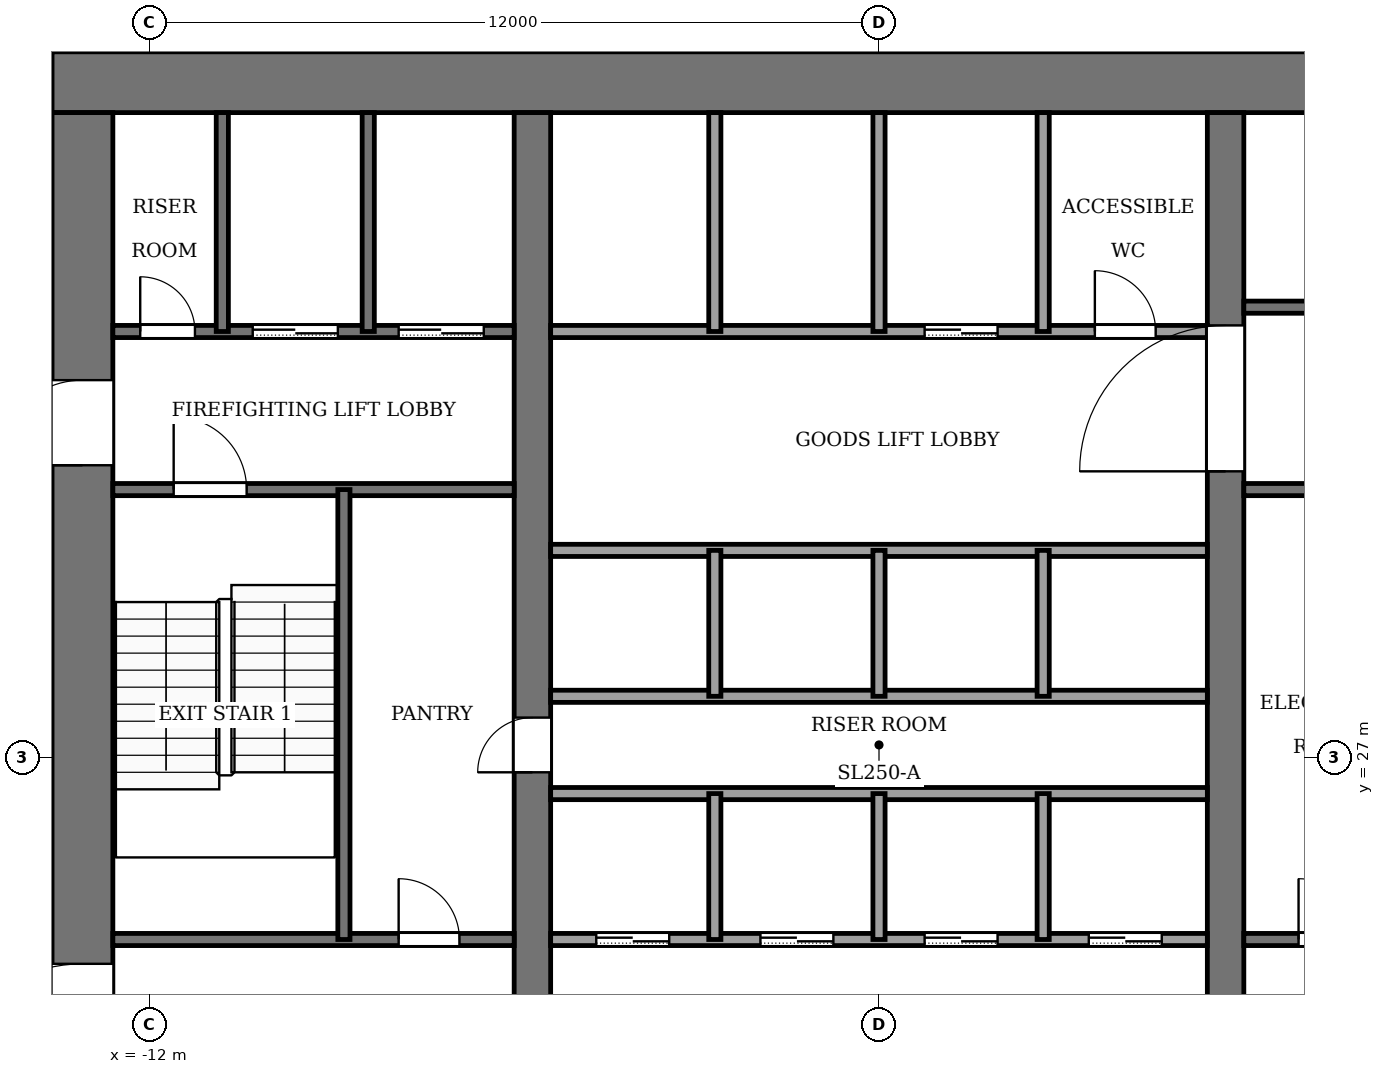
"""IFC4 building model, lengths in metres.
Left out: names, types, materials, properties, quantities, classifications, styles, units other than length and angle.
Written with IfcOpenShell. Run it as: python <this file> out.ifc"""

import sys

from ifc_helpers import new_model, si_unit, direction, frame, frame_2d, origin, place, context, subcontext, project, spatial, rectangle, extrude, element, fill, save


model = new_model("IFC4")
c1 = context("Model", 3, precision=1e-05, world=origin(), true_north=direction((0.0, 1.0)))
c2 = subcontext(c1, "Body", "Model", "MODEL_VIEW")
j1 = project(units=[si_unit("LENGTHUNIT", "METRE"), si_unit("PLANEANGLEUNIT", "RADIAN")], contexts=[c1])
p1 = place(None, origin())
s1 = spatial("IfcSite", under=j1, at=p1, CompositionType="ELEMENT")
p2 = place(p1, origin())
s2 = spatial("IfcBuilding", under=s1, at=p2, CompositionType="ELEMENT")
p3 = place(p2, frame((0.0, 0.0, 154.0)))
s3 = spatial("IfcBuildingStorey", under=s2, at=p3, CompositionType="ELEMENT", Elevation=154.0)
p4 = place(p3, frame((-13.6, 38.1, -0.13), z_axis=(0.0, 0.0, 1.0), x_axis=(1.0, 0.0, 0.0)))
e1 = element("IfcWall", 1, at=p4, inside=s3, PredefinedType="SHEAR", context=c2, shape_type="SweptSolid", body=[
    extrude(rectangle(XDim=27.2, YDim=1.0, at=frame_2d((13.6, 0.0))), origin(), (0.0, 0.0, 1.0), 4.0),
])
p5 = place(p3, frame((-13.1, 18.4, -0.13), z_axis=(0.0, 0.0, 1.0), x_axis=(0.0, 1.0, 0.0)))
e2 = element("IfcWall", 2, at=p5, inside=s3, PredefinedType="SHEAR", context=c2, shape_type="SweptSolid", body=[
    extrude(rectangle(XDim=19.2, YDim=1.0, at=frame_2d((9.6, 0.0))), origin(), (0.0, 0.0, 1.0), 4.0),
])
p6 = place(p5, frame((2.8, 0.0, 0.13)))
e3 = element("IfcOpeningElement", 3, at=p6, cuts=e2, PredefinedType="OPENING", context=c2, shape_type="SweptSolid", body=[
    extrude(rectangle(XDim=2.4, YDim=2.4, at=frame_2d((1.2, 1.2))), frame((0.0, 0.51, 0.0), z_axis=(0.0, -1.0, 0.0), x_axis=(1.0, 0.0, 0.0)), (0.0, 0.0, 1.0), 1.02),
])
p7 = place(p5, frame((13.4, 0.0, 0.13)))
e4 = element("IfcOpeningElement", 4, at=p7, cuts=e2, PredefinedType="OPENING", context=c2, shape_type="SweptSolid", body=[
    extrude(rectangle(XDim=1.4, YDim=2.2, at=frame_2d((0.7, 1.1))), frame((0.0, 0.51, 0.0), z_axis=(0.0, -1.0, 0.0), x_axis=(1.0, 0.0, 0.0)), (0.0, 0.0, 1.0), 1.02),
])
p8 = place(p3, frame((-5.7, 18.4, -0.13), z_axis=(0.0, 0.0, 1.0), x_axis=(0.0, 1.0, 0.0)))
e5 = element("IfcWall", 5, at=p8, inside=s3, PredefinedType="SHEAR", context=c2, shape_type="SweptSolid", body=[
    extrude(rectangle(XDim=19.2, YDim=0.6, at=frame_2d((9.6, 0.0))), origin(), (0.0, 0.0, 1.0), 4.0),
])
p9 = place(p8, frame((8.35, 0.0, 0.13)))
e6 = element("IfcOpeningElement", 6, at=p9, cuts=e5, PredefinedType="OPENING", context=c2, shape_type="SweptSolid", body=[
    extrude(rectangle(XDim=0.9, YDim=2.1, at=frame_2d((0.45, 1.05))), frame((0.0, 0.31, 0.0), z_axis=(0.0, -1.0, 0.0), x_axis=(1.0, 0.0, 0.0)), (0.0, 0.0, 1.0), 0.62),
])
p10 = place(p3, frame((5.7, 18.4, -0.13), z_axis=(0.0, 0.0, 1.0), x_axis=(0.0, 1.0, 0.0)))
e7 = element("IfcWall", 7, at=p10, inside=s3, PredefinedType="SHEAR", context=c2, shape_type="SweptSolid", body=[
    extrude(rectangle(XDim=19.2, YDim=0.6, at=frame_2d((9.6, 0.0))), origin(), (0.0, 0.0, 1.0), 4.0),
])
p11 = place(p10, frame((13.3, 0.0, 0.13)))
e8 = element("IfcOpeningElement", 8, at=p11, cuts=e7, PredefinedType="OPENING", context=c2, shape_type="SweptSolid", body=[
    extrude(rectangle(XDim=2.4, YDim=2.4, at=frame_2d((1.2, 1.2))), frame((0.0, 0.31, 0.0), z_axis=(0.0, -1.0, 0.0), x_axis=(1.0, 0.0, 0.0)), (0.0, 0.0, 1.0), 0.62),
])
p12 = place(p3, frame((-12.6, 24.0, 0.0), z_axis=(0.0, 0.0, 1.0), x_axis=(1.0, 0.0, 0.0)))
e9 = element("IfcWall", 9, at=p12, inside=s3, PredefinedType="PARTITIONING", context=c2, shape_type="SweptSolid", body=[
    extrude(rectangle(XDim=6.6, YDim=0.2, at=frame_2d((3.3, 0.0))), origin(), (0.0, 0.0, 1.0), 3.87),
])
p13 = place(p12, frame((4.7, 0.0, 0.0)))
e10 = element("IfcOpeningElement", 10, at=p13, cuts=e9, PredefinedType="OPENING", context=c2, shape_type="SweptSolid", body=[
    extrude(rectangle(XDim=1.0, YDim=2.1, at=frame_2d((0.5, 1.05))), frame((0.0, 0.11, 0.0), z_axis=(0.0, -1.0, 0.0), x_axis=(1.0, 0.0, 0.0)), (0.0, 0.0, 1.0), 0.22),
])
p14 = place(p3, frame((-5.4, 24.0, 0.0), z_axis=(0.0, 0.0, 1.0), x_axis=(1.0, 0.0, 0.0)))
e11 = element("IfcWall", 11, at=p14, inside=s3, PredefinedType="PARTITIONING", context=c2, shape_type="SweptSolid", body=[
    extrude(rectangle(XDim=10.8, YDim=0.2, at=frame_2d((5.4, 0.0))), origin(), (0.0, 0.0, 1.0), 3.87),
])
p15 = place(p14, frame((0.75, 0.0, 0.0)))
e12 = element("IfcOpeningElement", 12, at=p15, cuts=e11, PredefinedType="OPENING", context=c2, shape_type="SweptSolid", body=[
    extrude(rectangle(XDim=1.2, YDim=2.2, at=frame_2d((0.6, 1.1))), frame((0.0, 0.11, 0.0), z_axis=(0.0, -1.0, 0.0), x_axis=(1.0, 0.0, 0.0)), (0.0, 0.0, 1.0), 0.22),
])
p16 = place(p14, frame((3.45, 0.0, 0.0)))
e13 = element("IfcOpeningElement", 13, at=p16, cuts=e11, PredefinedType="OPENING", context=c2, shape_type="SweptSolid", body=[
    extrude(rectangle(XDim=1.2, YDim=2.2, at=frame_2d((0.6, 1.1))), frame((0.0, 0.11, 0.0), z_axis=(0.0, -1.0, 0.0), x_axis=(1.0, 0.0, 0.0)), (0.0, 0.0, 1.0), 0.22),
])
p17 = place(p14, frame((6.15, 0.0, 0.0)))
e14 = element("IfcOpeningElement", 14, at=p17, cuts=e11, PredefinedType="OPENING", context=c2, shape_type="SweptSolid", body=[
    extrude(rectangle(XDim=1.2, YDim=2.2, at=frame_2d((0.6, 1.1))), frame((0.0, 0.11, 0.0), z_axis=(0.0, -1.0, 0.0), x_axis=(1.0, 0.0, 0.0)), (0.0, 0.0, 1.0), 0.22),
])
p18 = place(p14, frame((8.85, 0.0, 0.0)))
e15 = element("IfcOpeningElement", 15, at=p18, cuts=e11, PredefinedType="OPENING", context=c2, shape_type="SweptSolid", body=[
    extrude(rectangle(XDim=1.2, YDim=2.2, at=frame_2d((0.6, 1.1))), frame((0.0, 0.11, 0.0), z_axis=(0.0, -1.0, 0.0), x_axis=(1.0, 0.0, 0.0)), (0.0, 0.0, 1.0), 0.22),
])
p19 = place(p3, frame((6.0, 24.0, 0.0), z_axis=(0.0, 0.0, 1.0), x_axis=(1.0, 0.0, 0.0)))
e16 = element("IfcWall", 16, at=p19, inside=s3, PredefinedType="PARTITIONING", context=c2, shape_type="SweptSolid", body=[
    extrude(rectangle(XDim=6.6, YDim=0.2, at=frame_2d((3.3, 0.0))), origin(), (0.0, 0.0, 1.0), 3.87),
])
p20 = place(p19, frame((0.9, 0.0, 0.0)))
e17 = element("IfcOpeningElement", 17, at=p20, cuts=e16, PredefinedType="OPENING", context=c2, shape_type="SweptSolid", body=[
    extrude(rectangle(XDim=1.0, YDim=2.1, at=frame_2d((0.5, 1.05))), frame((0.0, 0.11, 0.0), z_axis=(0.0, -1.0, 0.0), x_axis=(1.0, 0.0, 0.0)), (0.0, 0.0, 1.0), 0.22),
])
p21 = place(p19, frame((4.4, 0.0, 0.0)))
e18 = element("IfcOpeningElement", 18, at=p21, cuts=e16, PredefinedType="OPENING", context=c2, shape_type="SweptSolid", body=[
    extrude(rectangle(XDim=1.2, YDim=2.2, at=frame_2d((0.6, 1.1))), frame((0.0, 0.11, 0.0), z_axis=(0.0, -1.0, 0.0), x_axis=(1.0, 0.0, 0.0)), (0.0, 0.0, 1.0), 0.22),
])
for number, where, z_axis, x_axis in (
    (19, (-5.4, 26.4, 0.0), (0.0, 0.0, 1.0), (1.0, 0.0, 0.0)),
    (20, (-5.4, 28.0, 0.0), (0.0, 0.0, 1.0), (1.0, 0.0, 0.0)),
    (21, (-5.4, 30.4, 0.0), (0.0, 0.0, 1.0), (1.0, 0.0, 0.0)),
):
    element("IfcWall", number, at=place(p3, frame(where, z_axis=z_axis, x_axis=x_axis)), inside=s3, PredefinedType="PARTITIONING", context=c2, shape_type="SweptSolid", body=[
        extrude(rectangle(XDim=10.8, YDim=0.2, at=frame_2d((5.4, 0.0))), origin(), (0.0, 0.0, 1.0), 3.87),
    ])
p22 = place(p3, frame((-12.6, 31.4, 0.0), z_axis=(0.0, 0.0, 1.0), x_axis=(1.0, 0.0, 0.0)))
e22 = element("IfcWall", 22, at=p22, inside=s3, PredefinedType="PARTITIONING", context=c2, shape_type="SweptSolid", body=[
    extrude(rectangle(XDim=6.6, YDim=0.2, at=frame_2d((3.3, 0.0))), origin(), (0.0, 0.0, 1.0), 3.87),
])
p23 = place(p22, frame((1.0, 0.0, 0.0)))
e23 = element("IfcOpeningElement", 23, at=p23, cuts=e22, PredefinedType="OPENING", context=c2, shape_type="SweptSolid", body=[
    extrude(rectangle(XDim=1.2, YDim=2.2, at=frame_2d((0.6, 1.1))), frame((0.0, 0.11, 0.0), z_axis=(0.0, -1.0, 0.0), x_axis=(1.0, 0.0, 0.0)), (0.0, 0.0, 1.0), 0.22),
])
p24 = place(p3, frame((6.0, 31.4, 0.0), z_axis=(0.0, 0.0, 1.0), x_axis=(1.0, 0.0, 0.0)))
e24 = element("IfcWall", 24, at=p24, inside=s3, PredefinedType="PARTITIONING", context=c2, shape_type="SweptSolid", body=[
    extrude(rectangle(XDim=6.6, YDim=0.2, at=frame_2d((3.3, 0.0))), origin(), (0.0, 0.0, 1.0), 3.87),
])
p25 = place(p3, frame((-12.6, 34.0, 0.0), z_axis=(0.0, 0.0, 1.0), x_axis=(1.0, 0.0, 0.0)))
e25 = element("IfcWall", 25, at=p25, inside=s3, PredefinedType="PARTITIONING", context=c2, shape_type="SweptSolid", body=[
    extrude(rectangle(XDim=6.6, YDim=0.2, at=frame_2d((3.3, 0.0))), origin(), (0.0, 0.0, 1.0), 3.87),
])
p26 = place(p25, frame((4.7, 0.0, 0.0)))
e26 = element("IfcOpeningElement", 26, at=p26, cuts=e25, PredefinedType="OPENING", context=c2, shape_type="SweptSolid", body=[
    extrude(rectangle(XDim=1.4, YDim=2.2, at=frame_2d((0.7, 1.1))), frame((0.0, 0.11, 0.0), z_axis=(0.0, -1.0, 0.0), x_axis=(1.0, 0.0, 0.0)), (0.0, 0.0, 1.0), 0.22),
])
p27 = place(p25, frame((2.3, 0.0, 0.0)))
e27 = element("IfcOpeningElement", 27, at=p27, cuts=e25, PredefinedType="OPENING", context=c2, shape_type="SweptSolid", body=[
    extrude(rectangle(XDim=1.4, YDim=2.2, at=frame_2d((0.7, 1.1))), frame((0.0, 0.11, 0.0), z_axis=(0.0, -1.0, 0.0), x_axis=(1.0, 0.0, 0.0)), (0.0, 0.0, 1.0), 0.22),
])
p28 = place(p25, frame((0.45, 0.0, 0.0)))
e28 = element("IfcOpeningElement", 28, at=p28, cuts=e25, PredefinedType="OPENING", context=c2, shape_type="SweptSolid", body=[
    extrude(rectangle(XDim=0.9, YDim=2.1, at=frame_2d((0.45, 1.05))), frame((0.0, 0.11, 0.0), z_axis=(0.0, -1.0, 0.0), x_axis=(1.0, 0.0, 0.0)), (0.0, 0.0, 1.0), 0.22),
])
p29 = place(p3, frame((-5.4, 34.0, 0.0), z_axis=(0.0, 0.0, 1.0), x_axis=(1.0, 0.0, 0.0)))
e29 = element("IfcWall", 29, at=p29, inside=s3, PredefinedType="PARTITIONING", context=c2, shape_type="SweptSolid", body=[
    extrude(rectangle(XDim=10.8, YDim=0.2, at=frame_2d((5.4, 0.0))), origin(), (0.0, 0.0, 1.0), 3.87),
])
p30 = place(p29, frame((6.15, 0.0, 0.0)))
e30 = element("IfcOpeningElement", 30, at=p30, cuts=e29, PredefinedType="OPENING", context=c2, shape_type="SweptSolid", body=[
    extrude(rectangle(XDim=1.2, YDim=2.2, at=frame_2d((0.6, 1.1))), frame((0.0, 0.11, 0.0), z_axis=(0.0, -1.0, 0.0), x_axis=(1.0, 0.0, 0.0)), (0.0, 0.0, 1.0), 0.22),
])
p31 = place(p29, frame((8.95, 0.0, 0.0)))
e31 = element("IfcOpeningElement", 31, at=p31, cuts=e29, PredefinedType="OPENING", context=c2, shape_type="SweptSolid", body=[
    extrude(rectangle(XDim=1.0, YDim=2.1, at=frame_2d((0.5, 1.05))), frame((0.0, 0.11, 0.0), z_axis=(0.0, -1.0, 0.0), x_axis=(1.0, 0.0, 0.0)), (0.0, 0.0, 1.0), 0.22),
])
p32 = place(p3, frame((6.0, 34.4, 0.0), z_axis=(0.0, 0.0, 1.0), x_axis=(1.0, 0.0, 0.0)))
e32 = element("IfcWall", 32, at=p32, inside=s3, PredefinedType="PARTITIONING", context=c2, shape_type="SweptSolid", body=[
    extrude(rectangle(XDim=6.6, YDim=0.2, at=frame_2d((3.3, 0.0))), origin(), (0.0, 0.0, 1.0), 3.87),
])
p33 = place(p32, frame((4.8, 0.0, 0.0)))
e33 = element("IfcOpeningElement", 33, at=p33, cuts=e32, PredefinedType="OPENING", context=c2, shape_type="SweptSolid", body=[
    extrude(rectangle(XDim=1.2, YDim=2.2, at=frame_2d((0.6, 1.1))), frame((0.0, 0.11, 0.0), z_axis=(0.0, -1.0, 0.0), x_axis=(1.0, 0.0, 0.0)), (0.0, 0.0, 1.0), 0.22),
])
p34 = place(p3, frame((-10.8, 34.0, 0.0), z_axis=(0.0, 0.0, 1.0), x_axis=(0.0, 1.0, 0.0)))
e34 = element("IfcWall", 34, at=p34, inside=s3, PredefinedType="PARTITIONING", context=c2, shape_type="SweptSolid", body=[
    extrude(rectangle(XDim=3.6, YDim=0.2, at=frame_2d((1.8, 0.0))), origin(), (0.0, 0.0, 1.0), 3.87),
])
p35 = place(p3, frame((-8.8, 24.0, 0.0), z_axis=(0.0, 0.0, 1.0), x_axis=(0.0, 1.0, 0.0)))
e35 = element("IfcWall", 35, at=p35, inside=s3, PredefinedType="PARTITIONING", context=c2, shape_type="SweptSolid", body=[
    extrude(rectangle(XDim=7.4, YDim=0.2, at=frame_2d((3.7, 0.0))), origin(), (0.0, 0.0, 1.0), 3.87),
])
p36 = place(p3, frame((-8.4, 34.0, 0.0), z_axis=(0.0, 0.0, 1.0), x_axis=(0.0, 1.0, 0.0)))
e36 = element("IfcWall", 36, at=p36, inside=s3, PredefinedType="PARTITIONING", context=c2, shape_type="SweptSolid", body=[
    extrude(rectangle(XDim=3.6, YDim=0.2, at=frame_2d((1.8, 0.0))), origin(), (0.0, 0.0, 1.0), 3.87),
])
for number, where, z_axis, x_axis in (
    (37, (-2.7, 24.0, 0.0), (0.0, 0.0, 1.0), (0.0, 1.0, 0.0)),
    (38, (-2.7, 28.0, 0.0), (0.0, 0.0, 1.0), (0.0, 1.0, 0.0)),
):
    element("IfcWall", number, at=place(p3, frame(where, z_axis=z_axis, x_axis=x_axis)), inside=s3, PredefinedType="PARTITIONING", context=c2, shape_type="SweptSolid", body=[
        extrude(rectangle(XDim=2.4, YDim=0.2, at=frame_2d((1.2, 0.0))), origin(), (0.0, 0.0, 1.0), 3.87),
    ])
p37 = place(p3, frame((-2.7, 34.0, 0.0), z_axis=(0.0, 0.0, 1.0), x_axis=(0.0, 1.0, 0.0)))
e39 = element("IfcWall", 39, at=p37, inside=s3, PredefinedType="PARTITIONING", context=c2, shape_type="SweptSolid", body=[
    extrude(rectangle(XDim=3.6, YDim=0.2, at=frame_2d((1.8, 0.0))), origin(), (0.0, 0.0, 1.0), 3.87),
])
for number, where, z_axis, x_axis in (
    (40, (0.0, 24.0, 0.0), (0.0, 0.0, 1.0), (0.0, 1.0, 0.0)),
    (41, (0.0, 28.0, 0.0), (0.0, 0.0, 1.0), (0.0, 1.0, 0.0)),
):
    element("IfcWall", number, at=place(p3, frame(where, z_axis=z_axis, x_axis=x_axis)), inside=s3, PredefinedType="PARTITIONING", context=c2, shape_type="SweptSolid", body=[
        extrude(rectangle(XDim=2.4, YDim=0.2, at=frame_2d((1.2, 0.0))), origin(), (0.0, 0.0, 1.0), 3.87),
    ])
p38 = place(p3, frame((0.0, 34.0, 0.0), z_axis=(0.0, 0.0, 1.0), x_axis=(0.0, 1.0, 0.0)))
e42 = element("IfcWall", 42, at=p38, inside=s3, PredefinedType="PARTITIONING", context=c2, shape_type="SweptSolid", body=[
    extrude(rectangle(XDim=3.6, YDim=0.2, at=frame_2d((1.8, 0.0))), origin(), (0.0, 0.0, 1.0), 3.87),
])
for number, where, z_axis, x_axis in (
    (43, (2.7, 24.0, 0.0), (0.0, 0.0, 1.0), (0.0, 1.0, 0.0)),
    (44, (2.7, 28.0, 0.0), (0.0, 0.0, 1.0), (0.0, 1.0, 0.0)),
):
    element("IfcWall", number, at=place(p3, frame(where, z_axis=z_axis, x_axis=x_axis)), inside=s3, PredefinedType="PARTITIONING", context=c2, shape_type="SweptSolid", body=[
        extrude(rectangle(XDim=2.4, YDim=0.2, at=frame_2d((1.2, 0.0))), origin(), (0.0, 0.0, 1.0), 3.87),
    ])
p39 = place(p3, frame((2.7, 34.0, 0.0), z_axis=(0.0, 0.0, 1.0), x_axis=(0.0, 1.0, 0.0)))
e45 = element("IfcWall", 45, at=p39, inside=s3, PredefinedType="PARTITIONING", context=c2, shape_type="SweptSolid", body=[
    extrude(rectangle(XDim=3.6, YDim=0.2, at=frame_2d((1.8, 0.0))), origin(), (0.0, 0.0, 1.0), 3.87),
])
p40 = place(p15, origin())
e46 = element("IfcDoor", 46, at=p40, inside=s3, OperationType="SLIDING_TO_LEFT", PredefinedType="DOOR", context=c2, shape_type="SweptSolid", body=[
    extrude(rectangle(XDim=1.2, YDim=2.2, at=frame_2d((0.6, 1.1))), frame((0.0, 0.025, 0.0), z_axis=(0.0, -1.0, 0.0), x_axis=(1.0, 0.0, 0.0)), (0.0, 0.0, 1.0), 0.05),
])
fill(e12, e46)
p41 = place(p16, origin())
e47 = element("IfcDoor", 47, at=p41, inside=s3, OperationType="SLIDING_TO_LEFT", PredefinedType="DOOR", context=c2, shape_type="SweptSolid", body=[
    extrude(rectangle(XDim=1.2, YDim=2.2, at=frame_2d((0.6, 1.1))), frame((0.0, 0.025, 0.0), z_axis=(0.0, -1.0, 0.0), x_axis=(1.0, 0.0, 0.0)), (0.0, 0.0, 1.0), 0.05),
])
fill(e13, e47)
p42 = place(p17, origin())
e48 = element("IfcDoor", 48, at=p42, inside=s3, OperationType="SLIDING_TO_LEFT", PredefinedType="DOOR", context=c2, shape_type="SweptSolid", body=[
    extrude(rectangle(XDim=1.2, YDim=2.2, at=frame_2d((0.6, 1.1))), frame((0.0, 0.025, 0.0), z_axis=(0.0, -1.0, 0.0), x_axis=(1.0, 0.0, 0.0)), (0.0, 0.0, 1.0), 0.05),
])
fill(e14, e48)
p43 = place(p18, origin())
e49 = element("IfcDoor", 49, at=p43, inside=s3, OperationType="SLIDING_TO_LEFT", PredefinedType="DOOR", context=c2, shape_type="SweptSolid", body=[
    extrude(rectangle(XDim=1.2, YDim=2.2, at=frame_2d((0.6, 1.1))), frame((0.0, 0.025, 0.0), z_axis=(0.0, -1.0, 0.0), x_axis=(1.0, 0.0, 0.0)), (0.0, 0.0, 1.0), 0.05),
])
fill(e15, e49)
p44 = place(p30, origin())
e50 = element("IfcDoor", 50, at=p44, inside=s3, OperationType="SLIDING_TO_LEFT", PredefinedType="DOOR", context=c2, shape_type="SweptSolid", body=[
    extrude(rectangle(XDim=1.2, YDim=2.2, at=frame_2d((0.6, 1.1))), frame((0.0, 0.025, 0.0), z_axis=(0.0, -1.0, 0.0), x_axis=(1.0, 0.0, 0.0)), (0.0, 0.0, 1.0), 0.05),
])
fill(e30, e50)
p45 = place(p26, origin())
e51 = element("IfcDoor", 51, at=p45, inside=s3, OperationType="SLIDING_TO_LEFT", PredefinedType="DOOR", context=c2, shape_type="SweptSolid", body=[
    extrude(rectangle(XDim=1.4, YDim=2.2, at=frame_2d((0.7, 1.1))), frame((0.0, 0.025, 0.0), z_axis=(0.0, -1.0, 0.0), x_axis=(1.0, 0.0, 0.0)), (0.0, 0.0, 1.0), 0.05),
])
fill(e26, e51)
p46 = place(p27, origin())
e52 = element("IfcDoor", 52, at=p46, inside=s3, OperationType="SLIDING_TO_LEFT", PredefinedType="DOOR", context=c2, shape_type="SweptSolid", body=[
    extrude(rectangle(XDim=1.4, YDim=2.2, at=frame_2d((0.7, 1.1))), frame((0.0, 0.025, 0.0), z_axis=(0.0, -1.0, 0.0), x_axis=(1.0, 0.0, 0.0)), (0.0, 0.0, 1.0), 0.05),
])
fill(e27, e52)
p47 = place(p28, origin())
e53 = element("IfcDoor", 53, at=p47, inside=s3, OperationType="SINGLE_SWING_RIGHT", PredefinedType="DOOR", context=c2, shape_type="SweptSolid", body=[
    extrude(rectangle(XDim=0.9, YDim=2.1, at=frame_2d((0.45, 1.05))), frame((0.0, 0.025, 0.0), z_axis=(0.0, -1.0, 0.0), x_axis=(1.0, 0.0, 0.0)), (0.0, 0.0, 1.0), 0.05),
])
fill(e28, e53)
p48 = place(p13, origin())
e54 = element("IfcDoor", 54, at=p48, inside=s3, OperationType="SINGLE_SWING_RIGHT", PredefinedType="DOOR", context=c2, shape_type="SweptSolid", body=[
    extrude(rectangle(XDim=1.0, YDim=2.1, at=frame_2d((0.5, 1.05))), frame((0.0, 0.025, 0.0), z_axis=(0.0, -1.0, 0.0), x_axis=(1.0, 0.0, 0.0)), (0.0, 0.0, 1.0), 0.05),
])
fill(e10, e54)
p49 = place(p20, origin())
e55 = element("IfcDoor", 55, at=p49, inside=s3, OperationType="SINGLE_SWING_LEFT", PredefinedType="DOOR", context=c2, shape_type="SweptSolid", body=[
    extrude(rectangle(XDim=1.0, YDim=2.1, at=frame_2d((0.5, 1.05))), frame((0.0, 0.025, 0.0), z_axis=(0.0, -1.0, 0.0), x_axis=(1.0, 0.0, 0.0)), (0.0, 0.0, 1.0), 0.05),
])
fill(e17, e55)
p50 = place(p31, origin())
e56 = element("IfcDoor", 56, at=p50, inside=s3, OperationType="SINGLE_SWING_LEFT", PredefinedType="DOOR", context=c2, shape_type="SweptSolid", body=[
    extrude(rectangle(XDim=1.0, YDim=2.1, at=frame_2d((0.5, 1.05))), frame((0.0, 0.025, 0.0), z_axis=(0.0, -1.0, 0.0), x_axis=(1.0, 0.0, 0.0)), (0.0, 0.0, 1.0), 0.05),
])
fill(e31, e56)
p51 = place(p9, origin())
e57 = element("IfcDoor", 57, at=p51, inside=s3, OperationType="SINGLE_SWING_RIGHT", PredefinedType="DOOR", context=c2, shape_type="SweptSolid", body=[
    extrude(rectangle(XDim=0.9, YDim=2.1, at=frame_2d((0.45, 1.05))), frame((0.0, 0.025, 0.0), z_axis=(0.0, -1.0, 0.0), x_axis=(1.0, 0.0, 0.0)), (0.0, 0.0, 1.0), 0.05),
])
fill(e6, e57)
p52 = place(p23, origin())
e58 = element("IfcDoor", 58, at=p52, inside=s3, OperationType="SINGLE_SWING_RIGHT", PredefinedType="DOOR", context=c2, shape_type="SweptSolid", body=[
    extrude(rectangle(XDim=1.2, YDim=2.2, at=frame_2d((0.6, 1.1))), frame((0.0, 0.025, 0.0), z_axis=(0.0, -1.0, 0.0), x_axis=(1.0, 0.0, 0.0)), (0.0, 0.0, 1.0), 0.05),
])
fill(e23, e58)
p53 = place(p11, origin())
e59 = element("IfcDoor", 59, at=p53, inside=s3, OperationType="DOUBLE_DOOR_SINGLE_SWING", PredefinedType="DOOR", context=c2, shape_type="SweptSolid", body=[
    extrude(rectangle(XDim=2.4, YDim=2.4, at=frame_2d((1.2, 1.2))), frame((0.0, 0.025, 0.0), z_axis=(0.0, -1.0, 0.0), x_axis=(1.0, 0.0, 0.0)), (0.0, 0.0, 1.0), 0.05),
])
fill(e8, e59)
p54 = place(p6, origin())
e60 = element("IfcDoor", 60, at=p54, inside=s3, OperationType="DOUBLE_DOOR_SINGLE_SWING", PredefinedType="DOOR", context=c2, shape_type="SweptSolid", body=[
    extrude(rectangle(XDim=2.4, YDim=2.4, at=frame_2d((1.2, 1.2))), frame((0.0, 0.025, 0.0), z_axis=(0.0, -1.0, 0.0), x_axis=(1.0, 0.0, 0.0)), (0.0, 0.0, 1.0), 0.05),
])
fill(e3, e60)
p55 = place(p7, origin())
e61 = element("IfcDoor", 61, at=p55, inside=s3, OperationType="SINGLE_SWING_RIGHT", PredefinedType="DOOR", context=c2, shape_type="SweptSolid", body=[
    extrude(rectangle(XDim=1.4, YDim=2.2, at=frame_2d((0.7, 1.1))), frame((0.0, 0.025, 0.0), z_axis=(0.0, -1.0, 0.0), x_axis=(1.0, 0.0, 0.0)), (0.0, 0.0, 1.0), 0.05),
])
fill(e4, e61)
save(model, sys.argv[1])
